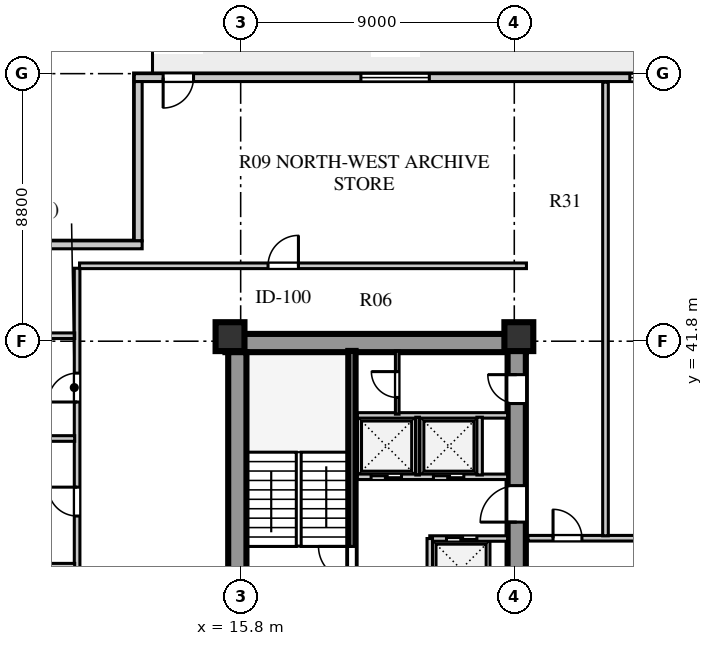
"""IFC4 building model, lengths in metres.
Left out: names, types, materials, properties, quantities, classifications, styles, units other than length and angle.
Written with IfcOpenShell. Run it as: python <this file> out.ifc"""

import sys

from ifc_helpers import new_model, si_unit, direction, frame, frame_2d, origin, origin_2d, place, context, subcontext, project, spatial, rectangle, extrude, element, fill, save


model = new_model("IFC4")
c1 = context("Model", 3, precision=1e-05, world=origin(), true_north=direction((0.0, 1.0)))
c2 = subcontext(c1, "Body", "Model", "MODEL_VIEW")
j1 = project(units=[si_unit("LENGTHUNIT", "METRE"), si_unit("PLANEANGLEUNIT", "RADIAN")], contexts=[c1])
p1 = place(None, origin())
s1 = spatial("IfcSite", under=j1, at=p1, CompositionType="ELEMENT")
p2 = place(p1, origin())
s2 = spatial("IfcBuilding", under=s1, at=p2, CompositionType="ELEMENT")
p3 = place(p2, frame((0.0, 0.0, 74.0)))
s3 = spatial("IfcBuildingStorey", under=s2, at=p3, CompositionType="ELEMENT", Elevation=74.0)
p4 = place(p3, frame((15.3, 41.74, 0.0), z_axis=(0.0, 0.0, 1.0), x_axis=(1.0, 0.0, 0.0)))
e1 = element("IfcWall", 1, at=p4, inside=s3, PredefinedType="SHEAR", context=c2, shape_type="SweptSolid", body=[
    extrude(rectangle(XDim=9.88, YDim=0.6, at=frame_2d((4.94, 0.0))), origin(), (0.0, 0.0, 1.0), 3.72),
])
p5 = place(p3, frame((15.69, 15.81, 0.0), z_axis=(0.0, 0.0, 1.0), x_axis=(0.0, 1.0, 0.0)))
e2 = element("IfcWall", 2, at=p5, inside=s3, PredefinedType="SHEAR", context=c2, shape_type="SweptSolid", body=[
    extrude(rectangle(XDim=25.63, YDim=0.6, at=frame_2d((12.815, 0.0))), origin(), (0.0, 0.0, 1.0), 3.72),
])
p6 = place(p3, frame((24.88, 15.74, 0.0), z_axis=(0.0, 0.0, 1.0), x_axis=(0.0, 1.0, 0.0)))
e3 = element("IfcWall", 3, at=p6, inside=s3, PredefinedType="SHEAR", context=c2, shape_type="SweptSolid", body=[
    extrude(rectangle(XDim=25.76, YDim=0.6, at=frame_2d((12.88, 0.0))), origin(), (0.0, 0.0, 1.0), 3.72),
])
p7 = place(p6, frame((1.61, 0.0, 0.0)))
e4 = element("IfcOpeningElement", 4, at=p7, cuts=e3, PredefinedType="OPENING", context=c2, shape_type="SweptSolid", body=[
    extrude(rectangle(XDim=1.2, YDim=2.1, at=frame_2d((0.6, 1.05))), frame((0.0, 0.31, 0.0), z_axis=(0.0, -1.0, 0.0), x_axis=(1.0, 0.0, 0.0)), (0.0, 0.0, 1.0), 0.62),
])
p8 = place(p6, frame((6.78, 0.0, 0.0)))
e5 = element("IfcOpeningElement", 5, at=p8, cuts=e3, PredefinedType="OPENING", context=c2, shape_type="SweptSolid", body=[
    extrude(rectangle(XDim=0.85, YDim=2.06, at=frame_2d((0.425, 1.03))), frame((0.0, 0.31, 0.0), z_axis=(0.0, -1.0, 0.0), x_axis=(1.0, 0.0, 0.0)), (0.0, 0.0, 1.0), 0.62),
])
p9 = place(p6, frame((12.11, 0.0, 0.0)))
e6 = element("IfcOpeningElement", 6, at=p9, cuts=e3, PredefinedType="OPENING", context=c2, shape_type="SweptSolid", body=[
    extrude(rectangle(XDim=1.5, YDim=2.12, at=frame_2d((0.75, 1.06))), frame((0.0, 0.31, 0.0), z_axis=(0.0, -1.0, 0.0), x_axis=(1.0, 0.0, 0.0)), (0.0, 0.0, 1.0), 0.62),
])
p10 = place(p6, frame((20.11, 0.0, 0.0)))
e7 = element("IfcOpeningElement", 7, at=p10, cuts=e3, PredefinedType="OPENING", context=c2, shape_type="SweptSolid", body=[
    extrude(rectangle(XDim=1.2, YDim=2.12, at=frame_2d((0.6, 1.06))), frame((0.0, 0.31, 0.0), z_axis=(0.0, -1.0, 0.0), x_axis=(1.0, 0.0, 0.0)), (0.0, 0.0, 1.0), 0.62),
])
p11 = place(p6, frame((24.01, 0.0, 0.0)))
e8 = element("IfcOpeningElement", 8, at=p11, cuts=e3, PredefinedType="OPENING", context=c2, shape_type="SweptSolid", body=[
    extrude(rectangle(XDim=0.95, YDim=2.1, at=frame_2d((0.475, 1.05))), frame((0.0, 0.31, 0.0), z_axis=(0.0, -1.0, 0.0), x_axis=(1.0, 0.0, 0.0)), (0.0, 0.0, 1.0), 0.62),
])
for number, where, z_axis, x_axis in (
    (9, (15.45, 41.95, 0.0), (0.0, 0.0, 1.0), (1.0, 0.0, 0.0)),
    (10, (24.95, 41.95, 0.0), (0.0, 0.0, 1.0), (1.0, 0.0, 0.0)),
):
    element("IfcColumn", number, at=place(p3, frame(where, z_axis=z_axis, x_axis=x_axis)), inside=s3, PredefinedType="COLUMN", context=c2, shape_type="SweptSolid", body=[
        extrude(rectangle(XDim=0.95, YDim=0.95, at=origin_2d()), origin(), (0.0, 0.0, 1.0), 3.72),
    ])
p12 = place(p3, frame((46.3, 50.47, 0.0), z_axis=(0.0, 0.0, 1.0), x_axis=(-1.0, 0.0, 0.0)))
e11 = element("IfcWall", 11, at=p12, inside=s3, PredefinedType="SOLIDWALL", context=c2, shape_type="SweptSolid", body=[
    extrude(rectangle(XDim=34.0, YDim=0.26, at=frame_2d((17.0, 0.0))), origin(), (0.0, 0.0, 1.0), 3.72),
])
p13 = place(p12, frame((32.05, 0.0, 0.0)))
e12 = element("IfcOpeningElement", 12, at=p13, cuts=e11, PredefinedType="OPENING", context=c2, shape_type="SweptSolid", body=[
    extrude(rectangle(XDim=1.0, YDim=2.05, at=frame_2d((0.5, 1.025))), frame((0.0, 0.14, 0.0), z_axis=(0.0, -1.0, 0.0), x_axis=(1.0, 0.0, 0.0)), (0.0, 0.0, 1.0), 0.28),
])
p14 = place(p12, frame((24.295, 0.0, 0.8)))
e13 = element("IfcOpeningElement", 13, at=p14, cuts=e11, PredefinedType="OPENING", context=c2, shape_type="SweptSolid", body=[
    extrude(rectangle(XDim=2.25, YDim=2.0, at=frame_2d((1.125, 1.0))), frame((0.0, 0.14, 0.0), z_axis=(0.0, -1.0, 0.0), x_axis=(1.0, 0.0, 0.0)), (0.0, 0.0, 1.0), 0.28),
])
p15 = place(p12, frame((15.9, 0.0, 0.8)))
e14 = element("IfcOpeningElement", 14, at=p15, cuts=e11, PredefinedType="OPENING", context=c2, shape_type="SweptSolid", body=[
    extrude(rectangle(XDim=1.8, YDim=2.0, at=frame_2d((0.9, 1.0))), frame((0.0, 0.14, 0.0), z_axis=(0.0, -1.0, 0.0), x_axis=(1.0, 0.0, 0.0)), (0.0, 0.0, 1.0), 0.28),
])
p16 = place(p12, frame((6.855, 0.0, 0.8)))
e15 = element("IfcOpeningElement", 15, at=p16, cuts=e11, PredefinedType="OPENING", context=c2, shape_type="SweptSolid", body=[
    extrude(rectangle(XDim=1.5, YDim=2.0, at=frame_2d((0.75, 1.0))), frame((0.0, 0.14, 0.0), z_axis=(0.0, -1.0, 0.0), x_axis=(1.0, 0.0, 0.0)), (0.0, 0.0, 1.0), 0.28),
])
p17 = place(p3, frame((12.43, 50.34, 0.0), z_axis=(0.0, 0.0, 1.0), x_axis=(0.0, -1.0, 0.0)))
e16 = element("IfcWall", 16, at=p17, inside=s3, PredefinedType="SOLIDWALL", context=c2, shape_type="SweptSolid", body=[
    extrude(rectangle(XDim=5.24, YDim=0.26, at=frame_2d((2.62, 0.0))), origin(), (0.0, 0.0, 1.0), 3.72),
])
p18 = place(p3, frame((12.56, 44.97, 0.0), z_axis=(0.0, 0.0, 1.0), x_axis=(-1.0, 0.0, 0.0)))
e17 = element("IfcWall", 17, at=p18, inside=s3, PredefinedType="SOLIDWALL", context=c2, shape_type="SweptSolid", body=[
    extrude(rectangle(XDim=5.76, YDim=0.26, at=frame_2d((2.88, 0.0))), origin(), (0.0, 0.0, 1.0), 3.72),
])
p19 = place(p3, frame((19.46, 33.3, 0.0), z_axis=(0.0, 0.0, 1.0), x_axis=(0.0, 1.0, 0.0)))
e18 = element("IfcWall", 18, at=p19, inside=s3, PredefinedType="SHEAR", context=c2, shape_type="SweptSolid", body=[
    extrude(rectangle(XDim=8.18, YDim=0.24, at=frame_2d((4.09, 0.0))), origin(), (0.0, 0.0, 1.0), 4.0),
])
p20 = place(p19, frame((0.65, 0.0, 0.0)))
e19 = element("IfcOpeningElement", 19, at=p20, cuts=e18, PredefinedType="OPENING", context=c2, shape_type="SweptSolid", body=[
    extrude(rectangle(XDim=1.1, YDim=2.1, at=frame_2d((0.55, 1.05))), frame((0.0, 0.13, 0.0), z_axis=(0.0, -1.0, 0.0), x_axis=(1.0, 0.0, 0.0)), (0.0, 0.0, 1.0), 0.26),
])
p21 = place(p3, frame((22.02, 35.31, 0.0), z_axis=(0.0, 0.0, 1.0), x_axis=(1.0, 0.0, 0.0)))
e20 = element("IfcWall", 20, at=p21, inside=s3, PredefinedType="SOLIDWALL", context=c2, shape_type="SweptSolid", body=[
    extrude(rectangle(XDim=2.56, YDim=0.18, at=frame_2d((1.28, 0.0))), origin(), (0.0, 0.0, 1.0), 3.72),
])
p22 = place(p21, frame((0.55, 0.0, 0.0)))
e21 = element("IfcOpeningElement", 21, at=p22, cuts=e20, PredefinedType="OPENING", context=c2, shape_type="SweptSolid", body=[
    extrude(rectangle(XDim=1.0, YDim=2.1, at=frame_2d((0.5, 1.05))), frame((0.0, 0.1, 0.0), z_axis=(0.0, -1.0, 0.0), x_axis=(1.0, 0.0, 0.0)), (0.0, 0.0, 1.0), 0.2),
])
p23 = place(p3, frame((22.02, 33.3, 0.0), z_axis=(0.0, 0.0, 1.0), x_axis=(0.0, 1.0, 0.0)))
e22 = element("IfcWall", 22, at=p23, inside=s3, PredefinedType="SOLIDWALL", context=c2, shape_type="SweptSolid", body=[
    extrude(rectangle(XDim=2.01, YDim=0.18, at=frame_2d((1.005, 0.0))), origin(), (0.0, 0.0, 1.0), 3.72),
])
p24 = place(p3, frame((19.64, 37.34, 0.0), z_axis=(0.0, 0.0, 1.0), x_axis=(1.0, 0.0, 0.0)))
e23 = element("IfcWall", 23, at=p24, inside=s3, PredefinedType="SOLIDWALL", context=c2, shape_type="SweptSolid", body=[
    extrude(rectangle(XDim=4.94, YDim=0.18, at=frame_2d((2.47, 0.0))), origin(), (0.0, 0.0, 1.0), 3.72),
])
p25 = place(p24, frame((0.45, 0.0, 0.0)))
e24 = element("IfcOpeningElement", 24, at=p25, cuts=e23, PredefinedType="OPENING", context=c2, shape_type="SweptSolid", body=[
    extrude(rectangle(XDim=1.0, YDim=2.1, at=frame_2d((0.5, 1.05))), frame((0.0, 0.1, 0.0), z_axis=(0.0, -1.0, 0.0), x_axis=(1.0, 0.0, 0.0)), (0.0, 0.0, 1.0), 0.2),
])
p26 = place(p24, frame((2.5, 0.0, 0.0)))
e25 = element("IfcOpeningElement", 25, at=p26, cuts=e23, PredefinedType="OPENING", context=c2, shape_type="SweptSolid", body=[
    extrude(rectangle(XDim=1.0, YDim=2.1, at=frame_2d((0.5, 1.05))), frame((0.0, 0.1, 0.0), z_axis=(0.0, -1.0, 0.0), x_axis=(1.0, 0.0, 0.0)), (0.0, 0.0, 1.0), 0.2),
])
p27 = place(p3, frame((19.64, 39.36, 0.0), z_axis=(0.0, 0.0, 1.0), x_axis=(1.0, 0.0, 0.0)))
e26 = element("IfcWall", 26, at=p27, inside=s3, PredefinedType="SOLIDWALL", context=c2, shape_type="SweptSolid", body=[
    extrude(rectangle(XDim=4.94, YDim=0.18, at=frame_2d((2.47, 0.0))), origin(), (0.0, 0.0, 1.0), 3.72),
])
p28 = place(p3, frame((21.62, 37.4, 0.0), z_axis=(0.0, 0.0, 1.0), x_axis=(0.0, 1.0, 0.0)))
e27 = element("IfcWall", 27, at=p28, inside=s3, PredefinedType="PARTITIONING", context=c2, shape_type="SweptSolid", body=[
    extrude(rectangle(XDim=1.9, YDim=0.12, at=frame_2d((0.95, 0.0))), origin(), (0.0, 0.0, 1.0), 3.72),
])
p29 = place(p3, frame((23.66, 37.4, 0.0), z_axis=(0.0, 0.0, 1.0), x_axis=(0.0, 1.0, 0.0)))
e28 = element("IfcWall", 28, at=p29, inside=s3, PredefinedType="SOLIDWALL", context=c2, shape_type="SweptSolid", body=[
    extrude(rectangle(XDim=1.9, YDim=0.18, at=frame_2d((0.95, 0.0))), origin(), (0.0, 0.0, 1.0), 3.72),
])
p30 = place(p3, frame((20.95, 39.4, 0.0), z_axis=(0.0, 0.0, 1.0), x_axis=(0.0, 1.0, 0.0)))
e29 = element("IfcWall", 29, at=p30, inside=s3, PredefinedType="PARTITIONING", context=c2, shape_type="SweptSolid", body=[
    extrude(rectangle(XDim=2.08, YDim=0.12, at=frame_2d((1.04, 0.0))), origin(), (0.0, 0.0, 1.0), 3.72),
])
p31 = place(p30, frame((0.55, 0.0, 0.0)))
e30 = element("IfcOpeningElement", 30, at=p31, cuts=e29, PredefinedType="OPENING", context=c2, shape_type="SweptSolid", body=[
    extrude(rectangle(XDim=0.85, YDim=2.06, at=frame_2d((0.425, 1.03))), frame((0.0, 0.07, 0.0), z_axis=(0.0, -1.0, 0.0), x_axis=(1.0, 0.0, 0.0)), (0.0, 0.0, 1.0), 0.14),
])
p32 = place(p3, frame((25.25, 35.32, 0.0), z_axis=(0.0, 0.0, 1.0), x_axis=(1.0, 0.0, 0.0)))
e31 = element("IfcWall", 31, at=p32, inside=s3, PredefinedType="SOLIDWALL", context=c2, shape_type="SweptSolid", body=[
    extrude(rectangle(XDim=9.47, YDim=0.185, at=frame_2d((4.735, 0.0))), origin(), (0.0, 0.0, 1.0), 3.72),
])
p33 = place(p32, frame((0.825, 0.0, 0.0)))
e32 = element("IfcOpeningElement", 32, at=p33, cuts=e31, PredefinedType="OPENING", context=c2, shape_type="SweptSolid", body=[
    extrude(rectangle(XDim=0.95, YDim=2.08, at=frame_2d((0.475, 1.04))), frame((0.0, 0.103, 0.0), z_axis=(0.0, -1.0, 0.0), x_axis=(1.0, 0.0, 0.0)), (0.0, 0.0, 1.0), 0.205),
])
p34 = place(p32, frame((3.775, 0.0, 0.0)))
e33 = element("IfcOpeningElement", 33, at=p34, cuts=e31, PredefinedType="OPENING", context=c2, shape_type="SweptSolid", body=[
    extrude(rectangle(XDim=0.95, YDim=2.08, at=frame_2d((0.475, 1.04))), frame((0.0, 0.103, 0.0), z_axis=(0.0, -1.0, 0.0), x_axis=(1.0, 0.0, 0.0)), (0.0, 0.0, 1.0), 0.205),
])
p35 = place(p32, frame((7.215, 0.0, 0.0)))
e34 = element("IfcOpeningElement", 34, at=p35, cuts=e31, PredefinedType="OPENING", context=c2, shape_type="SweptSolid", body=[
    extrude(rectangle(XDim=0.95, YDim=2.08, at=frame_2d((0.475, 1.04))), frame((0.0, 0.103, 0.0), z_axis=(0.0, -1.0, 0.0), x_axis=(1.0, 0.0, 0.0)), (0.0, 0.0, 1.0), 0.205),
])
p36 = place(p3, frame((10.42, 13.0, 0.0), z_axis=(0.0, 0.0, 1.0), x_axis=(0.0, 1.0, 0.0)))
e35 = element("IfcWall", 35, at=p36, inside=s3, PredefinedType="SOLIDWALL", context=c2, shape_type="SweptSolid", body=[
    extrude(rectangle(XDim=31.2, YDim=0.185, at=frame_2d((15.6, 0.0))), origin(), (0.0, 0.0, 1.0), 3.72),
])
p37 = place(p36, frame((3.95, 0.0, 0.0)))
e36 = element("IfcOpeningElement", 36, at=p37, cuts=e35, PredefinedType="OPENING", context=c2, shape_type="SweptSolid", body=[
    extrude(rectangle(XDim=0.95, YDim=2.08, at=frame_2d((0.475, 1.04))), frame((0.0, 0.103, 0.0), z_axis=(0.0, -1.0, 0.0), x_axis=(1.0, 0.0, 0.0)), (0.0, 0.0, 1.0), 0.205),
])
p38 = place(p36, frame((8.5, 0.0, 0.0)))
e37 = element("IfcOpeningElement", 37, at=p38, cuts=e35, PredefinedType="OPENING", context=c2, shape_type="SweptSolid", body=[
    extrude(rectangle(XDim=0.95, YDim=2.08, at=frame_2d((0.475, 1.04))), frame((0.0, 0.103, 0.0), z_axis=(0.0, -1.0, 0.0), x_axis=(1.0, 0.0, 0.0)), (0.0, 0.0, 1.0), 0.205),
])
p39 = place(p36, frame((13.45, 0.0, 0.0)))
e38 = element("IfcOpeningElement", 38, at=p39, cuts=e35, PredefinedType="OPENING", context=c2, shape_type="SweptSolid", body=[
    extrude(rectangle(XDim=0.95, YDim=2.08, at=frame_2d((0.475, 1.04))), frame((0.0, 0.103, 0.0), z_axis=(0.0, -1.0, 0.0), x_axis=(1.0, 0.0, 0.0)), (0.0, 0.0, 1.0), 0.205),
])
p40 = place(p36, frame((18.45, 0.0, 0.0)))
e39 = element("IfcOpeningElement", 39, at=p40, cuts=e35, PredefinedType="OPENING", context=c2, shape_type="SweptSolid", body=[
    extrude(rectangle(XDim=0.95, YDim=2.08, at=frame_2d((0.475, 1.04))), frame((0.0, 0.103, 0.0), z_axis=(0.0, -1.0, 0.0), x_axis=(1.0, 0.0, 0.0)), (0.0, 0.0, 1.0), 0.205),
])
p41 = place(p36, frame((23.05, 0.0, 0.0)))
e40 = element("IfcOpeningElement", 40, at=p41, cuts=e35, PredefinedType="OPENING", context=c2, shape_type="SweptSolid", body=[
    extrude(rectangle(XDim=0.95, YDim=2.08, at=frame_2d((0.475, 1.04))), frame((0.0, 0.103, 0.0), z_axis=(0.0, -1.0, 0.0), x_axis=(1.0, 0.0, 0.0)), (0.0, 0.0, 1.0), 0.205),
])
p42 = place(p36, frame((26.8, 0.0, 0.0)))
e41 = element("IfcOpeningElement", 41, at=p42, cuts=e35, PredefinedType="OPENING", context=c2, shape_type="SweptSolid", body=[
    extrude(rectangle(XDim=0.95, YDim=2.08, at=frame_2d((0.475, 1.04))), frame((0.0, 0.103, 0.0), z_axis=(0.0, -1.0, 0.0), x_axis=(1.0, 0.0, 0.0)), (0.0, 0.0, 1.0), 0.205),
])
p43 = place(p3, frame((7.08, 41.98, 0.0), z_axis=(0.0, 0.0, 1.0), x_axis=(1.0, 0.0, 0.0)))
e42 = element("IfcWall", 42, at=p43, inside=s3, PredefinedType="SOLIDWALL", context=c2, shape_type="SweptSolid", body=[
    extrude(rectangle(XDim=3.26, YDim=0.185, at=frame_2d((1.63, 0.0))), origin(), (0.0, 0.0, 1.0), 3.22),
])
p44 = place(p3, frame((10.5, 44.28, 0.0), z_axis=(0.0, 0.0, 1.0), x_axis=(1.0, 0.0, 0.0)))
e43 = element("IfcWall", 43, at=p44, inside=s3, PredefinedType="SOLIDWALL", context=c2, shape_type="SweptSolid", body=[
    extrude(rectangle(XDim=14.7, YDim=0.185, at=frame_2d((7.35, 0.0))), origin(), (0.0, 0.0, 1.0), 3.72),
])
p45 = place(p44, frame((6.2, 0.0, 0.0)))
e44 = element("IfcOpeningElement", 44, at=p45, cuts=e43, PredefinedType="OPENING", context=c2, shape_type="SweptSolid", body=[
    extrude(rectangle(XDim=1.0, YDim=2.08, at=frame_2d((0.5, 1.04))), frame((0.0, 0.103, 0.0), z_axis=(0.0, -1.0, 0.0), x_axis=(1.0, 0.0, 0.0)), (0.0, 0.0, 1.0), 0.205),
])
for number, where, z_axis, x_axis in (
    (45, (7.08, 34.4, 0.0), (0.0, 0.0, 1.0), (1.0, 0.0, 0.0)),
    (46, (7.08, 38.6, 0.0), (0.0, 0.0, 1.0), (1.0, 0.0, 0.0)),
):
    element("IfcWall", number, at=place(p3, frame(where, z_axis=z_axis, x_axis=x_axis)), inside=s3, PredefinedType="SOLIDWALL", context=c2, shape_type="SweptSolid", body=[
        extrude(rectangle(XDim=3.26, YDim=0.185, at=frame_2d((1.63, 0.0))), origin(), (0.0, 0.0, 1.0), 3.72),
    ])
p46 = place(p3, frame((27.8, 35.4, 0.0), z_axis=(0.0, 0.0, 1.0), x_axis=(0.0, 1.0, 0.0)))
e47 = element("IfcWall", 47, at=p46, inside=s3, PredefinedType="SOLIDWALL", context=c2, shape_type="SweptSolid", body=[
    extrude(rectangle(XDim=14.92, YDim=0.185, at=frame_2d((7.46, 0.0))), origin(), (0.0, 0.0, 1.0), 3.72),
])
p47 = place(p13, frame((1.0, 0.0, 0.0), z_axis=(0.0, 0.0, 1.0), x_axis=(-1.0, 0.0, 0.0)))
e48 = element("IfcDoor", 48, at=p47, inside=s3, OperationType="SINGLE_SWING_LEFT", PredefinedType="DOOR", context=c2, shape_type="SweptSolid", body=[
    extrude(rectangle(XDim=1.0, YDim=2.05, at=frame_2d((0.5, 1.025))), frame((0.0, 0.025, 0.0), z_axis=(0.0, -1.0, 0.0), x_axis=(1.0, 0.0, 0.0)), (0.0, 0.0, 1.0), 0.05),
])
fill(e12, e48)
p48 = place(p14, origin())
e49 = element("IfcWindow", 49, at=p48, inside=s3, PartitioningType="SINGLE_PANEL", PredefinedType="WINDOW", context=c2, shape_type="SweptSolid", body=[
    extrude(rectangle(XDim=2.25, YDim=2.0, at=frame_2d((1.125, 1.0))), frame((0.0, 0.03, 0.0), z_axis=(0.0, -1.0, 0.0), x_axis=(1.0, 0.0, 0.0)), (0.0, 0.0, 1.0), 0.06),
])
fill(e13, e49)
p49 = place(p15, origin())
e50 = element("IfcWindow", 50, at=p49, inside=s3, PartitioningType="SINGLE_PANEL", PredefinedType="WINDOW", context=c2, shape_type="SweptSolid", body=[
    extrude(rectangle(XDim=1.8, YDim=2.0, at=frame_2d((0.9, 1.0))), frame((0.0, 0.03, 0.0), z_axis=(0.0, -1.0, 0.0), x_axis=(1.0, 0.0, 0.0)), (0.0, 0.0, 1.0), 0.06),
])
fill(e14, e50)
p50 = place(p20, origin())
e51 = element("IfcDoor", 51, at=p50, inside=s3, OperationType="SINGLE_SWING_RIGHT", PredefinedType="DOOR", context=c2, shape_type="SweptSolid", body=[
    extrude(rectangle(XDim=1.1, YDim=2.1, at=frame_2d((0.55, 1.05))), frame((0.0, 0.025, 0.0), z_axis=(0.0, -1.0, 0.0), x_axis=(1.0, 0.0, 0.0)), (0.0, 0.0, 1.0), 0.05),
])
fill(e19, e51)
p51 = place(p10, frame((1.2, 0.0, 0.0), z_axis=(0.0, 0.0, 1.0), x_axis=(-1.0, 0.0, 0.0)))
e52 = element("IfcDoor", 52, at=p51, inside=s3, OperationType="SINGLE_SWING_RIGHT", PredefinedType="DOOR", context=c2, shape_type="SweptSolid", body=[
    extrude(rectangle(XDim=1.2, YDim=2.12, at=frame_2d((0.6, 1.06))), frame((0.0, 0.025, 0.0), z_axis=(0.0, -1.0, 0.0), x_axis=(1.0, 0.0, 0.0)), (0.0, 0.0, 1.0), 0.05),
])
fill(e7, e52)
p52 = place(p25, frame((1.0, 0.0, 0.0), z_axis=(0.0, 0.0, 1.0), x_axis=(-1.0, 0.0, 0.0)))
e53 = element("IfcDoor", 53, at=p52, inside=s3, OperationType="DOUBLE_DOOR_SLIDING", PredefinedType="DOOR", context=c2, shape_type="SweptSolid", body=[
    extrude(rectangle(XDim=1.0, YDim=2.1, at=frame_2d((0.5, 1.05))), frame((0.0, 0.025, 0.0), z_axis=(0.0, -1.0, 0.0), x_axis=(1.0, 0.0, 0.0)), (0.0, 0.0, 1.0), 0.05),
])
fill(e24, e53)
p53 = place(p26, frame((1.0, 0.0, 0.0), z_axis=(0.0, 0.0, 1.0), x_axis=(-1.0, 0.0, 0.0)))
e54 = element("IfcDoor", 54, at=p53, inside=s3, OperationType="DOUBLE_DOOR_SLIDING", PredefinedType="DOOR", context=c2, shape_type="SweptSolid", body=[
    extrude(rectangle(XDim=1.0, YDim=2.1, at=frame_2d((0.5, 1.05))), frame((0.0, 0.025, 0.0), z_axis=(0.0, -1.0, 0.0), x_axis=(1.0, 0.0, 0.0)), (0.0, 0.0, 1.0), 0.05),
])
fill(e25, e54)
p54 = place(p22, origin())
e55 = element("IfcDoor", 55, at=p54, inside=s3, OperationType="DOUBLE_DOOR_SLIDING", PredefinedType="DOOR", context=c2, shape_type="SweptSolid", body=[
    extrude(rectangle(XDim=1.0, YDim=2.1, at=frame_2d((0.5, 1.05))), frame((0.0, 0.025, 0.0), z_axis=(0.0, -1.0, 0.0), x_axis=(1.0, 0.0, 0.0)), (0.0, 0.0, 1.0), 0.05),
])
fill(e21, e55)
p55 = place(p31, origin())
e56 = element("IfcDoor", 56, at=p55, inside=s3, OperationType="SINGLE_SWING_RIGHT", PredefinedType="DOOR", context=c2, shape_type="SweptSolid", body=[
    extrude(rectangle(XDim=0.85, YDim=2.06, at=frame_2d((0.425, 1.03))), frame((0.0, 0.025, 0.0), z_axis=(0.0, -1.0, 0.0), x_axis=(1.0, 0.0, 0.0)), (0.0, 0.0, 1.0), 0.05),
])
fill(e30, e56)
p56 = place(p11, frame((0.95, 0.0, 0.0), z_axis=(0.0, 0.0, 1.0), x_axis=(-1.0, 0.0, 0.0)))
e57 = element("IfcDoor", 57, at=p56, inside=s3, OperationType="SINGLE_SWING_LEFT", PredefinedType="DOOR", context=c2, shape_type="SweptSolid", body=[
    extrude(rectangle(XDim=0.95, YDim=2.1, at=frame_2d((0.475, 1.05))), frame((0.0, 0.025, 0.0), z_axis=(0.0, -1.0, 0.0), x_axis=(1.0, 0.0, 0.0)), (0.0, 0.0, 1.0), 0.05),
])
fill(e8, e57)
p57 = place(p45, origin())
e58 = element("IfcDoor", 58, at=p57, inside=s3, OperationType="SINGLE_SWING_RIGHT", PredefinedType="DOOR", context=c2, shape_type="SweptSolid", body=[
    extrude(rectangle(XDim=1.0, YDim=2.08, at=frame_2d((0.5, 1.04))), frame((0.0, 0.025, 0.0), z_axis=(0.0, -1.0, 0.0), x_axis=(1.0, 0.0, 0.0)), (0.0, 0.0, 1.0), 0.05),
])
fill(e44, e58)
p58 = place(p41, frame((0.95, 0.0, 0.0), z_axis=(0.0, 0.0, 1.0), x_axis=(-1.0, 0.0, 0.0)))
e59 = element("IfcDoor", 59, at=p58, inside=s3, OperationType="SINGLE_SWING_LEFT", PredefinedType="DOOR", context=c2, shape_type="SweptSolid", body=[
    extrude(rectangle(XDim=0.95, YDim=2.08, at=frame_2d((0.475, 1.04))), frame((0.0, 0.025, 0.0), z_axis=(0.0, -1.0, 0.0), x_axis=(1.0, 0.0, 0.0)), (0.0, 0.0, 1.0), 0.05),
])
fill(e40, e59)
p59 = place(p42, frame((0.95, 0.0, 0.0), z_axis=(0.0, 0.0, 1.0), x_axis=(-1.0, 0.0, 0.0)))
e60 = element("IfcDoor", 60, at=p59, inside=s3, OperationType="SINGLE_SWING_RIGHT", PredefinedType="DOOR", context=c2, shape_type="SweptSolid", body=[
    extrude(rectangle(XDim=0.95, YDim=2.08, at=frame_2d((0.475, 1.04))), frame((0.0, 0.025, 0.0), z_axis=(0.0, -1.0, 0.0), x_axis=(1.0, 0.0, 0.0)), (0.0, 0.0, 1.0), 0.05),
])
fill(e41, e60)
p60 = place(p33, origin())
e61 = element("IfcDoor", 61, at=p60, inside=s3, OperationType="SINGLE_SWING_LEFT", PredefinedType="DOOR", context=c2, shape_type="SweptSolid", body=[
    extrude(rectangle(XDim=0.95, YDim=2.08, at=frame_2d((0.475, 1.04))), frame((0.0, 0.025, 0.0), z_axis=(0.0, -1.0, 0.0), x_axis=(1.0, 0.0, 0.0)), (0.0, 0.0, 1.0), 0.05),
])
fill(e32, e61)
save(model, sys.argv[1])
